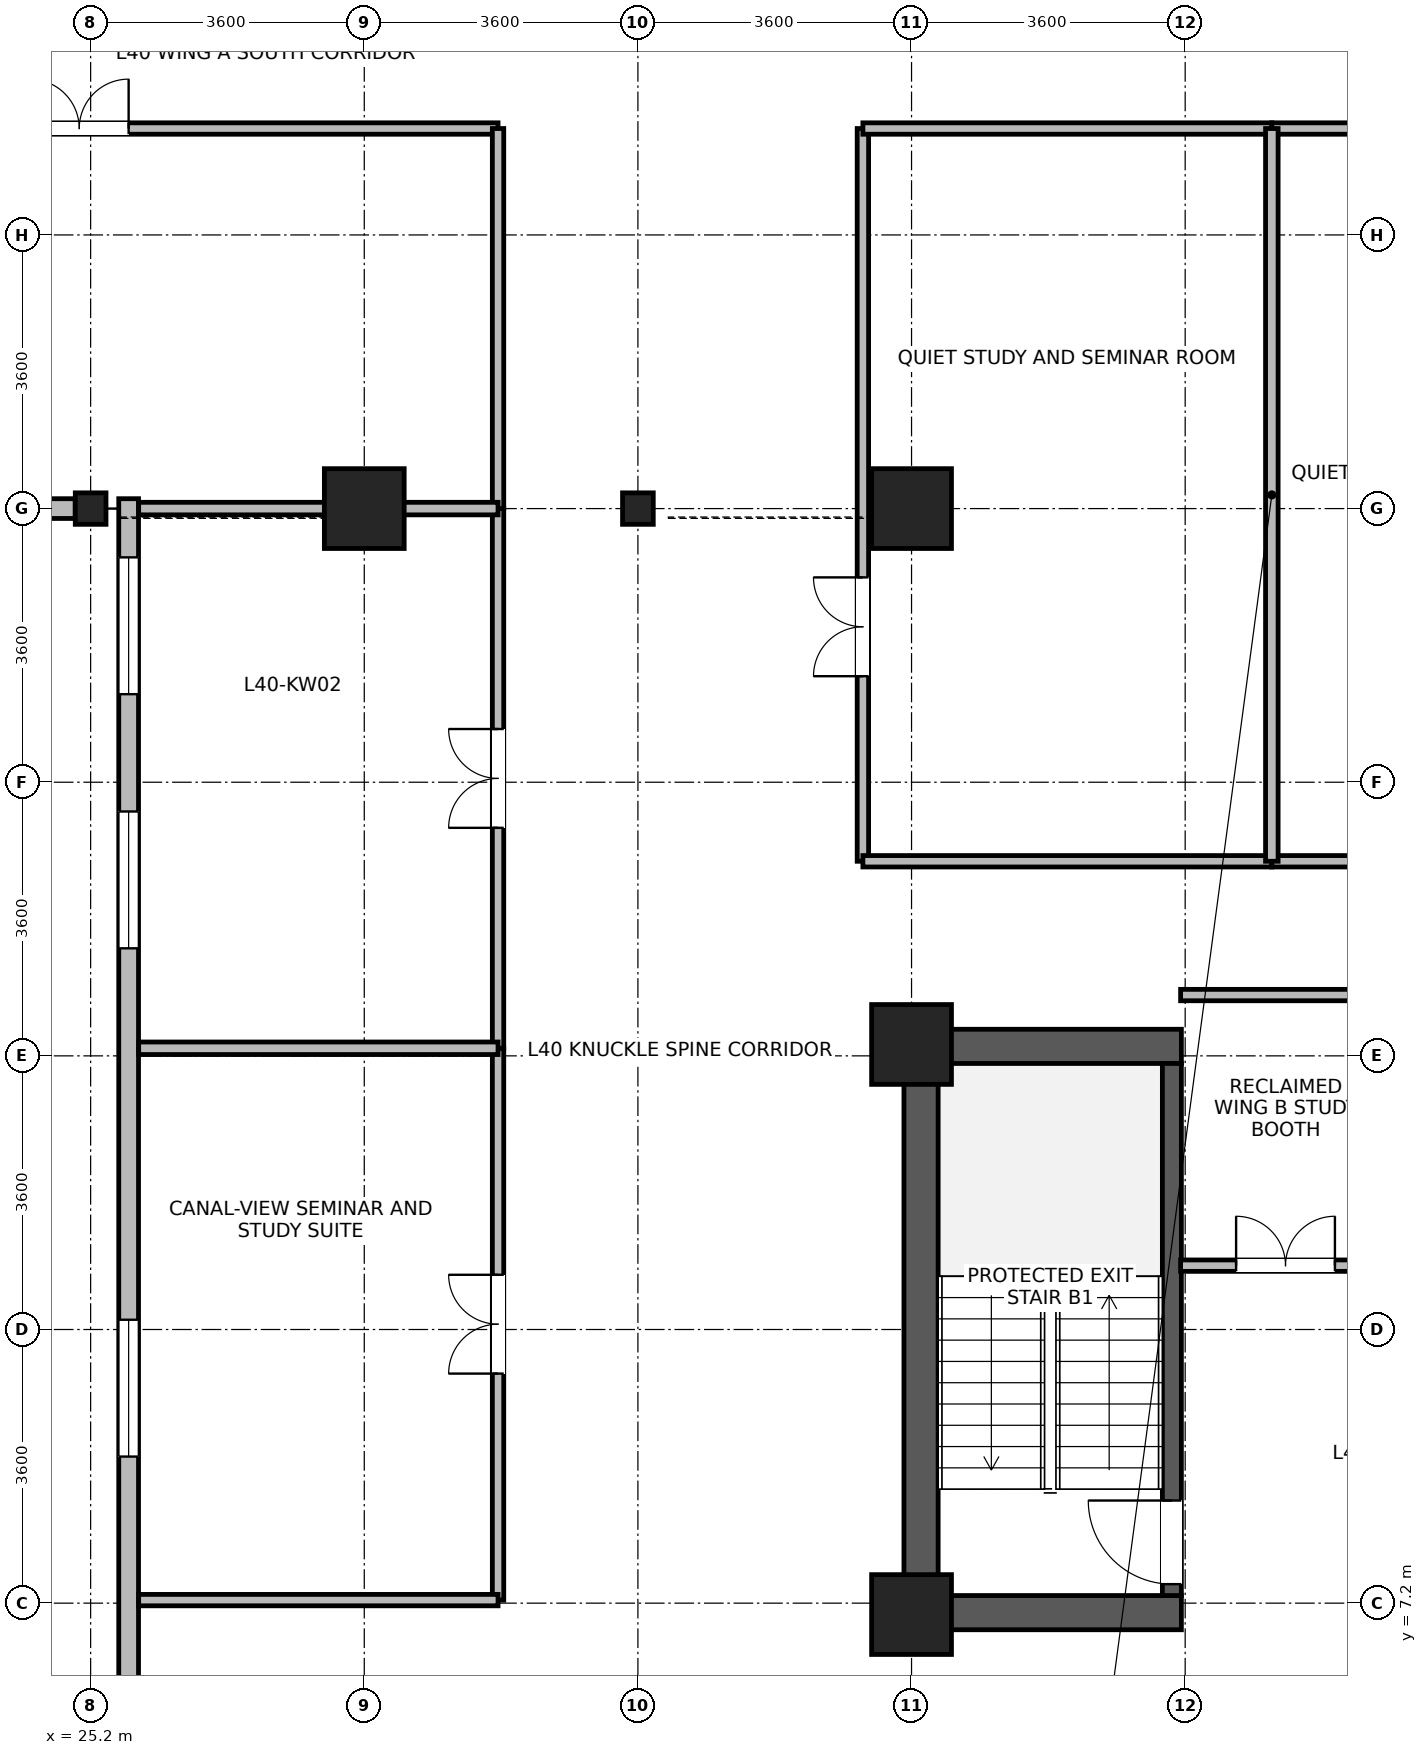
"""IFC4 building model, lengths in metres.
Left out: names, types, materials, properties, quantities, classifications, styles, units other than length and angle.
Written with IfcOpenShell. Run it as: python <this file> out.ifc"""

import sys

from ifc_helpers import new_model, si_unit, direction, frame, frame_2d, origin, origin_2d, place, context, subcontext, project, spatial, rectangle, i_section, extrude, source, transform, mapped, element, fill, save


model = new_model("IFC4")
c1 = context("Model", 3, precision=1e-05, world=origin(), true_north=direction((0.0, 1.0)))
c2 = subcontext(c1, "Body", "Model", "MODEL_VIEW")
j1 = project(units=[si_unit("LENGTHUNIT", "METRE"), si_unit("PLANEANGLEUNIT", "RADIAN")], contexts=[c1])
p1 = place(None, origin())
s1 = spatial("IfcSite", under=j1, at=p1, CompositionType="ELEMENT")
p2 = place(p1, origin())
s2 = spatial("IfcBuilding", under=s1, at=p2, CompositionType="ELEMENT")
p3 = place(p2, frame((0.0, 0.0, 158.7)))
s3 = spatial("IfcBuildingStorey", under=s2, at=p3, CompositionType="ELEMENT", Elevation=158.7)
p4 = place(p3, frame((36.125, 6.85, 0.0), z_axis=(0.0, 0.0, 1.0), x_axis=(0.0, 1.0, 0.0)))
e1 = element("IfcWall", 1, at=p4, inside=s3, PredefinedType="SHEAR", context=c2, shape_type="SweptSolid", body=[
    extrude(rectangle(XDim=7.9, YDim=0.45, at=frame_2d((3.95, 0.0))), origin(), (0.0, 0.0, 1.0), 3.46),
])
for number, where, z_axis, x_axis in (
    (2, (36.35, 7.075, 0.0), (0.0, 0.0, 1.0), (1.0, 0.0, 0.0)),
    (3, (36.35, 14.525, 0.0), (0.0, 0.0, 1.0), (1.0, 0.0, 0.0)),
):
    element("IfcWall", number, at=place(p3, frame(where, z_axis=z_axis, x_axis=x_axis)), inside=s3, PredefinedType="SHEAR", context=c2, shape_type="SweptSolid", body=[
        extrude(rectangle(XDim=3.2, YDim=0.45, at=frame_2d((1.6, 0.0))), origin(), (0.0, 0.0, 1.0), 3.46),
    ])
p5 = place(p3, frame((39.425, 7.3, 0.0), z_axis=(0.0, 0.0, 1.0), x_axis=(0.0, 1.0, 0.0)))
e4 = element("IfcWall", 4, at=p5, inside=s3, PredefinedType="SHEAR", context=c2, shape_type="SweptSolid", body=[
    extrude(rectangle(XDim=7.0, YDim=0.25, at=frame_2d((3.5, 0.0))), origin(), (0.0, 0.0, 1.0), 3.46),
])
p6 = place(p5, frame((0.15, 0.0, 0.0)))
e5 = element("IfcOpeningElement", 5, at=p6, cuts=e4, PredefinedType="OPENING", context=c2, shape_type="SweptSolid", body=[
    extrude(rectangle(XDim=1.1, YDim=2.08, at=frame_2d((0.55, 1.04))), frame((0.0, 0.135, 0.0), z_axis=(0.0, -1.0, 0.0), x_axis=(1.0, 0.0, 0.0)), (0.0, 0.0, 1.0), 0.27),
])
m1 = source(origin(), c2, "Body", "SweptSolid", [
    extrude(rectangle(XDim=1.05, YDim=1.05, at=origin_2d()), origin(), (0.0, 0.0, 1.0), 3.7),
])
for number, where, z_axis, x_axis in (
    (6, (28.8, 21.6, 0.0), (0.0, 0.0, 1.0), (1.0, 0.0, 0.0)),
    (7, (36.0, 21.6, 0.0), (0.0, 0.0, 1.0), (1.0, 0.0, 0.0)),
    (8, (36.0, 7.05, 0.0), (0.0, 0.0, 1.0), (1.0, 0.0, 0.0)),
    (9, (36.0, 14.55, 0.0), (0.0, 0.0, 1.0), (1.0, 0.0, 0.0)),
):
    element("IfcColumn", number, at=place(p3, frame(where, z_axis=z_axis, x_axis=x_axis)), inside=s3, PredefinedType="COLUMN", context=c2, shape_type="MappedRepresentation", body=[
        mapped(m1, transform((0.0, 0.0, 0.0), x_axis=(1.0, 0.0, 0.0), y_axis=(0.0, 1.0, 0.0), z_axis=(0.0, 0.0, 1.0), scale=1.0)),
    ])
m2 = source(origin(), c2, "Body", "SweptSolid", [
    extrude(i_section(OverallWidth=0.404, OverallDepth=0.414, WebThickness=0.021, FlangeThickness=0.028, FilletRadius=0.015, at=origin_2d()), origin(), (0.0, 0.0, 1.0), 3.7),
])
for number, where, z_axis, x_axis in (
    (10, (25.2, 21.6, 0.0), (0.0, 0.0, 1.0), (1.0, 0.0, 0.0)),
    (11, (32.4, 21.6, 0.0), (0.0, 0.0, 1.0), (1.0, 0.0, 0.0)),
):
    element("IfcColumn", number, at=place(p3, frame(where, z_axis=z_axis, x_axis=x_axis)), inside=s3, PredefinedType="COLUMN", context=c2, shape_type="MappedRepresentation", body=[
        mapped(m2, transform((0.0, 0.0, 0.0), x_axis=(1.0, 0.0, 0.0), y_axis=(0.0, 1.0, 0.0), z_axis=(0.0, 0.0, 1.0), scale=1.0)),
    ])
p7 = place(p3, frame((24.997, 21.6, 0.0), z_axis=(0.0, 0.0, 1.0), x_axis=(-1.0, 0.0, 0.0)))
e12 = element("IfcWall", 12, at=p7, inside=s3, PredefinedType="STANDARD", context=c2, shape_type="SweptSolid", body=[
    extrude(rectangle(XDim=2.871, YDim=0.26, at=frame_2d((1.436, 0.0))), origin(), (0.0, 0.0, 1.0), 2.99),
])
p8 = place(p7, frame((0.96, 0.0, 0.85)))
e13 = element("IfcOpeningElement", 13, at=p8, cuts=e12, PredefinedType="OPENING", context=c2, shape_type="SweptSolid", body=[
    extrude(rectangle(XDim=0.95, YDim=1.75, at=frame_2d((0.475, 0.875))), frame((0.0, 0.14, 0.0), z_axis=(0.0, -1.0, 0.0), x_axis=(1.0, 0.0, 0.0)), (0.0, 0.0, 1.0), 0.28),
])
p9 = place(p3, frame((25.7, 1.67, 0.0), z_axis=(0.0, 0.0, 1.0), x_axis=(0.0, 1.0, 0.0)))
e14 = element("IfcWall", 14, at=p9, inside=s3, PredefinedType="STANDARD", context=c2, shape_type="SweptSolid", body=[
    extrude(rectangle(XDim=20.06, YDim=0.26, at=frame_2d((10.03, 0.0))), origin(), (0.0, 0.0, 1.0), 3.44),
])
p10 = place(p9, frame((0.772, 0.0, 0.85)))
e15 = element("IfcOpeningElement", 15, at=p10, cuts=e14, PredefinedType="OPENING", context=c2, shape_type="SweptSolid", body=[
    extrude(rectangle(XDim=1.8, YDim=1.85, at=frame_2d((0.9, 0.925))), frame((0.0, 0.14, 0.0), z_axis=(0.0, -1.0, 0.0), x_axis=(1.0, 0.0, 0.0)), (0.0, 0.0, 1.0), 0.28),
])
p11 = place(p9, frame((7.458, 0.0, 0.85)))
e16 = element("IfcOpeningElement", 16, at=p11, cuts=e14, PredefinedType="OPENING", context=c2, shape_type="SweptSolid", body=[
    extrude(rectangle(XDim=1.8, YDim=1.85, at=frame_2d((0.9, 0.925))), frame((0.0, 0.14, 0.0), z_axis=(0.0, -1.0, 0.0), x_axis=(1.0, 0.0, 0.0)), (0.0, 0.0, 1.0), 0.28),
])
p12 = place(p9, frame((14.145, 0.0, 0.85)))
e17 = element("IfcOpeningElement", 17, at=p12, cuts=e14, PredefinedType="OPENING", context=c2, shape_type="SweptSolid", body=[
    extrude(rectangle(XDim=1.8, YDim=1.85, at=frame_2d((0.9, 0.925))), frame((0.0, 0.14, 0.0), z_axis=(0.0, -1.0, 0.0), x_axis=(1.0, 0.0, 0.0)), (0.0, 0.0, 1.0), 0.28),
])
p13 = place(p9, frame((17.488, 0.0, 0.85)))
e18 = element("IfcOpeningElement", 18, at=p13, cuts=e14, PredefinedType="OPENING", context=c2, shape_type="SweptSolid", body=[
    extrude(rectangle(XDim=1.8, YDim=1.85, at=frame_2d((0.9, 0.925))), frame((0.0, 0.14, 0.0), z_axis=(0.0, -1.0, 0.0), x_axis=(1.0, 0.0, 0.0)), (0.0, 0.0, 1.0), 0.28),
])
p14 = place(p3, frame((19.54, 26.6, 0.0), z_axis=(0.0, 0.0, 1.0), x_axis=(1.0, 0.0, 0.0)))
e19 = element("IfcWall", 19, at=p14, inside=s3, PredefinedType="PARTITIONING", context=c2, shape_type="SweptSolid", body=[
    extrude(rectangle(XDim=11.02, YDim=0.15, at=frame_2d((5.51, 0.0))), origin(), (0.0, 0.0, 1.0), 3.44),
])
p15 = place(p14, frame((4.86, 0.0, 0.0)))
e20 = element("IfcOpeningElement", 20, at=p15, cuts=e19, PredefinedType="OPENING", context=c2, shape_type="SweptSolid", body=[
    extrude(rectangle(XDim=1.3, YDim=2.12, at=frame_2d((0.65, 1.06))), frame((0.0, 0.085, 0.0), z_axis=(0.0, -1.0, 0.0), x_axis=(1.0, 0.0, 0.0)), (0.0, 0.0, 1.0), 0.17),
])
p16 = place(p3, frame((35.36, 16.96, 0.0), z_axis=(0.0, 0.0, 1.0), x_axis=(0.0, 1.0, 0.0)))
e21 = element("IfcWall", 21, at=p16, inside=s3, PredefinedType="PARTITIONING", context=c2, shape_type="SweptSolid", body=[
    extrude(rectangle(XDim=9.64, YDim=0.15, at=frame_2d((4.82, 0.0))), origin(), (0.0, 0.0, 1.0), 3.44),
])
p17 = place(p16, frame((2.435, 0.0, 0.0)))
e22 = element("IfcOpeningElement", 22, at=p17, cuts=e21, PredefinedType="OPENING", context=c2, shape_type="SweptSolid", body=[
    extrude(rectangle(XDim=1.3, YDim=2.12, at=frame_2d((0.65, 1.06))), frame((0.0, 0.085, 0.0), z_axis=(0.0, -1.0, 0.0), x_axis=(1.0, 0.0, 0.0)), (0.0, 0.0, 1.0), 0.17),
])
p18 = place(p3, frame((30.56, 7.24, 0.0), z_axis=(0.0, 0.0, 1.0), x_axis=(0.0, 1.0, 0.0)))
e23 = element("IfcWall", 23, at=p18, inside=s3, PredefinedType="PARTITIONING", context=c2, shape_type="SweptSolid", body=[
    extrude(rectangle(XDim=7.26, YDim=0.15, at=frame_2d((3.63, 0.0))), origin(), (0.0, 0.0, 1.0), 3.44),
])
p19 = place(p18, frame((2.98, 0.0, 0.0)))
e24 = element("IfcOpeningElement", 24, at=p19, cuts=e23, PredefinedType="OPENING", context=c2, shape_type="SweptSolid", body=[
    extrude(rectangle(XDim=1.3, YDim=2.12, at=frame_2d((0.65, 1.06))), frame((0.0, 0.085, 0.0), z_axis=(0.0, -1.0, 0.0), x_axis=(1.0, 0.0, 0.0)), (0.0, 0.0, 1.0), 0.17),
])
p20 = place(p3, frame((30.56, 14.5, 0.0), z_axis=(0.0, 0.0, 1.0), x_axis=(0.0, 1.0, 0.0)))
e25 = element("IfcWall", 25, at=p20, inside=s3, PredefinedType="PARTITIONING", context=c2, shape_type="SweptSolid", body=[
    extrude(rectangle(XDim=7.1, YDim=0.15, at=frame_2d((3.55, 0.0))), origin(), (0.0, 0.0, 1.0), 3.44),
])
p21 = place(p20, frame((2.9, 0.0, 0.0)))
e26 = element("IfcOpeningElement", 26, at=p21, cuts=e25, PredefinedType="OPENING", context=c2, shape_type="SweptSolid", body=[
    extrude(rectangle(XDim=1.3, YDim=2.12, at=frame_2d((0.65, 1.06))), frame((0.0, 0.085, 0.0), z_axis=(0.0, -1.0, 0.0), x_axis=(1.0, 0.0, 0.0)), (0.0, 0.0, 1.0), 0.17),
])
for number, where, z_axis, x_axis in (
    (27, (35.36, 16.96, 0.0), (0.0, 0.0, 1.0), (1.0, 0.0, 0.0)),
    (28, (35.36, 26.6, 0.0), (0.0, 0.0, 1.0), (1.0, 0.0, 0.0)),
):
    element("IfcWall", number, at=place(p3, frame(where, z_axis=z_axis, x_axis=x_axis)), inside=s3, PredefinedType="PARTITIONING", context=c2, shape_type="SweptSolid", body=[
        extrude(rectangle(XDim=5.38, YDim=0.15, at=frame_2d((2.69, 0.0))), origin(), (0.0, 0.0, 1.0), 3.44),
    ])
p22 = place(p3, frame((30.56, 21.6, 0.0), z_axis=(0.0, 0.0, 1.0), x_axis=(0.0, 1.0, 0.0)))
e29 = element("IfcWall", 29, at=p22, inside=s3, PredefinedType="PARTITIONING", context=c2, shape_type="SweptSolid", body=[
    extrude(rectangle(XDim=5.0, YDim=0.15, at=frame_2d((2.5, 0.0))), origin(), (0.0, 0.0, 1.0), 3.44),
])
p23 = place(p3, frame((40.74, 16.96, 0.0), z_axis=(0.0, 0.0, 1.0), x_axis=(1.0, 0.0, 0.0)))
e30 = element("IfcWall", 30, at=p23, inside=s3, PredefinedType="PARTITIONING", context=c2, shape_type="SweptSolid", body=[
    extrude(rectangle(XDim=4.98, YDim=0.15, at=frame_2d((2.49, 0.0))), origin(), (0.0, 0.0, 1.0), 3.44),
])
p24 = place(p23, frame((1.84, 0.0, 0.0)))
e31 = element("IfcOpeningElement", 31, at=p24, cuts=e30, PredefinedType="OPENING", context=c2, shape_type="SweptSolid", body=[
    extrude(rectangle(XDim=1.3, YDim=2.12, at=frame_2d((0.65, 1.06))), frame((0.0, 0.085, 0.0), z_axis=(0.0, -1.0, 0.0), x_axis=(1.0, 0.0, 0.0)), (0.0, 0.0, 1.0), 0.17),
])
p25 = place(p3, frame((40.74, 26.6, 0.0), z_axis=(0.0, 0.0, 1.0), x_axis=(1.0, 0.0, 0.0)))
e32 = element("IfcWall", 32, at=p25, inside=s3, PredefinedType="PARTITIONING", context=c2, shape_type="SweptSolid", body=[
    extrude(rectangle(XDim=4.98, YDim=0.15, at=frame_2d((2.49, 0.0))), origin(), (0.0, 0.0, 1.0), 3.44),
])
p26 = place(p3, frame((25.832, 7.24, 0.0), z_axis=(0.0, 0.0, 1.0), x_axis=(1.0, 0.0, 0.0)))
e33 = element("IfcWall", 33, at=p26, inside=s3, PredefinedType="PARTITIONING", context=c2, shape_type="SweptSolid", body=[
    extrude(rectangle(XDim=4.728, YDim=0.15, at=frame_2d((2.364, 0.0))), origin(), (0.0, 0.0, 1.0), 3.44),
])
p27 = place(p3, frame((39.54, 11.64, 0.0), z_axis=(0.0, 0.0, 1.0), x_axis=(1.0, 0.0, 0.0)))
e34 = element("IfcWall", 34, at=p27, inside=s3, PredefinedType="PARTITIONING", context=c2, shape_type="SweptSolid", body=[
    extrude(rectangle(XDim=2.76, YDim=0.15, at=frame_2d((1.38, 0.0))), origin(), (0.0, 0.0, 1.0), 3.44),
])
p28 = place(p27, frame((0.73, 0.0, 0.0)))
e35 = element("IfcOpeningElement", 35, at=p28, cuts=e34, PredefinedType="OPENING", context=c2, shape_type="SweptSolid", body=[
    extrude(rectangle(XDim=1.3, YDim=2.12, at=frame_2d((0.65, 1.06))), frame((0.0, 0.085, 0.0), z_axis=(0.0, -1.0, 0.0), x_axis=(1.0, 0.0, 0.0)), (0.0, 0.0, 1.0), 0.17),
])
p29 = place(p3, frame((39.54, 15.2, 0.0), z_axis=(0.0, 0.0, 1.0), x_axis=(1.0, 0.0, 0.0)))
e36 = element("IfcWall", 36, at=p29, inside=s3, PredefinedType="PARTITIONING", context=c2, shape_type="SweptSolid", body=[
    extrude(rectangle(XDim=2.76, YDim=0.15, at=frame_2d((1.38, 0.0))), origin(), (0.0, 0.0, 1.0), 3.44),
])
p30 = place(p3, frame((40.74, 16.96, 0.0), z_axis=(0.0, 0.0, 1.0), x_axis=(0.0, 1.0, 0.0)))
e37 = element("IfcWall", 37, at=p30, inside=s3, PredefinedType="PARTITIONING", context=c2, shape_type="SweptSolid", body=[
    extrude(rectangle(XDim=9.64, YDim=0.165, at=frame_2d((4.82, 0.0))), origin(), (0.0, 0.0, 1.0), 3.44),
])
p31 = place(p3, frame((25.832, 14.5, 0.0), z_axis=(0.0, 0.0, 1.0), x_axis=(1.0, 0.0, 0.0)))
e38 = element("IfcWall", 38, at=p31, inside=s3, PredefinedType="PARTITIONING", context=c2, shape_type="SweptSolid", body=[
    extrude(rectangle(XDim=4.728, YDim=0.165, at=frame_2d((2.364, 0.0))), origin(), (0.0, 0.0, 1.0), 3.44),
])
p32 = place(p3, frame((25.832, 21.6, 0.0), z_axis=(0.0, 0.0, 1.0), x_axis=(1.0, 0.0, 0.0)))
e39 = element("IfcWall", 39, at=p32, inside=s3, PredefinedType="PARTITIONING", context=c2, shape_type="SweptSolid", body=[
    extrude(rectangle(XDim=4.728, YDim=0.165, at=frame_2d((2.364, 0.0))), origin(), (0.0, 0.0, 1.0), 2.99),
])
p33 = place(p11, origin())
e40 = element("IfcWindow", 40, at=p33, inside=s3, PartitioningType="SINGLE_PANEL", PredefinedType="WINDOW", context=c2, shape_type="SweptSolid", body=[
    extrude(rectangle(XDim=1.8, YDim=1.85, at=frame_2d((0.9, 0.925))), frame((0.0, 0.03, 0.0), z_axis=(0.0, -1.0, 0.0), x_axis=(1.0, 0.0, 0.0)), (0.0, 0.0, 1.0), 0.06),
])
fill(e16, e40)
p34 = place(p12, origin())
e41 = element("IfcWindow", 41, at=p34, inside=s3, PartitioningType="SINGLE_PANEL", PredefinedType="WINDOW", context=c2, shape_type="SweptSolid", body=[
    extrude(rectangle(XDim=1.8, YDim=1.85, at=frame_2d((0.9, 0.925))), frame((0.0, 0.03, 0.0), z_axis=(0.0, -1.0, 0.0), x_axis=(1.0, 0.0, 0.0)), (0.0, 0.0, 1.0), 0.06),
])
fill(e17, e41)
p35 = place(p13, origin())
e42 = element("IfcWindow", 42, at=p35, inside=s3, PartitioningType="SINGLE_PANEL", PredefinedType="WINDOW", context=c2, shape_type="SweptSolid", body=[
    extrude(rectangle(XDim=1.8, YDim=1.85, at=frame_2d((0.9, 0.925))), frame((0.0, 0.03, 0.0), z_axis=(0.0, -1.0, 0.0), x_axis=(1.0, 0.0, 0.0)), (0.0, 0.0, 1.0), 0.06),
])
fill(e18, e42)
p36 = place(p6, origin())
e43 = element("IfcDoor", 43, at=p36, inside=s3, OperationType="SINGLE_SWING_RIGHT", PredefinedType="DOOR", context=c2, shape_type="SweptSolid", body=[
    extrude(rectangle(XDim=1.1, YDim=2.08, at=frame_2d((0.55, 1.04))), frame((0.0, 0.025, 0.0), z_axis=(0.0, -1.0, 0.0), x_axis=(1.0, 0.0, 0.0)), (0.0, 0.0, 1.0), 0.05),
])
fill(e5, e43)
p37 = place(p15, origin())
e44 = element("IfcDoor", 44, at=p37, inside=s3, OperationType="DOUBLE_DOOR_SINGLE_SWING", PredefinedType="DOOR", context=c2, shape_type="SweptSolid", body=[
    extrude(rectangle(XDim=1.3, YDim=2.12, at=frame_2d((0.65, 1.06))), frame((0.0, 0.025, 0.0), z_axis=(0.0, -1.0, 0.0), x_axis=(1.0, 0.0, 0.0)), (0.0, 0.0, 1.0), 0.05),
])
fill(e20, e44)
p38 = place(p17, origin())
e45 = element("IfcDoor", 45, at=p38, inside=s3, OperationType="DOUBLE_DOOR_SINGLE_SWING", PredefinedType="DOOR", context=c2, shape_type="SweptSolid", body=[
    extrude(rectangle(XDim=1.3, YDim=2.12, at=frame_2d((0.65, 1.06))), frame((0.0, 0.025, 0.0), z_axis=(0.0, -1.0, 0.0), x_axis=(1.0, 0.0, 0.0)), (0.0, 0.0, 1.0), 0.05),
])
fill(e22, e45)
p39 = place(p19, origin())
e46 = element("IfcDoor", 46, at=p39, inside=s3, OperationType="DOUBLE_DOOR_SINGLE_SWING", PredefinedType="DOOR", context=c2, shape_type="SweptSolid", body=[
    extrude(rectangle(XDim=1.3, YDim=2.12, at=frame_2d((0.65, 1.06))), frame((0.0, 0.025, 0.0), z_axis=(0.0, -1.0, 0.0), x_axis=(1.0, 0.0, 0.0)), (0.0, 0.0, 1.0), 0.05),
])
fill(e24, e46)
p40 = place(p21, origin())
e47 = element("IfcDoor", 47, at=p40, inside=s3, OperationType="DOUBLE_DOOR_SINGLE_SWING", PredefinedType="DOOR", context=c2, shape_type="SweptSolid", body=[
    extrude(rectangle(XDim=1.3, YDim=2.12, at=frame_2d((0.65, 1.06))), frame((0.0, 0.025, 0.0), z_axis=(0.0, -1.0, 0.0), x_axis=(1.0, 0.0, 0.0)), (0.0, 0.0, 1.0), 0.05),
])
fill(e26, e47)
p41 = place(p28, origin())
e48 = element("IfcDoor", 48, at=p41, inside=s3, OperationType="DOUBLE_DOOR_SINGLE_SWING", PredefinedType="DOOR", context=c2, shape_type="SweptSolid", body=[
    extrude(rectangle(XDim=1.3, YDim=2.12, at=frame_2d((0.65, 1.06))), frame((0.0, 0.025, 0.0), z_axis=(0.0, -1.0, 0.0), x_axis=(1.0, 0.0, 0.0)), (0.0, 0.0, 1.0), 0.05),
])
fill(e35, e48)
save(model, sys.argv[1])
